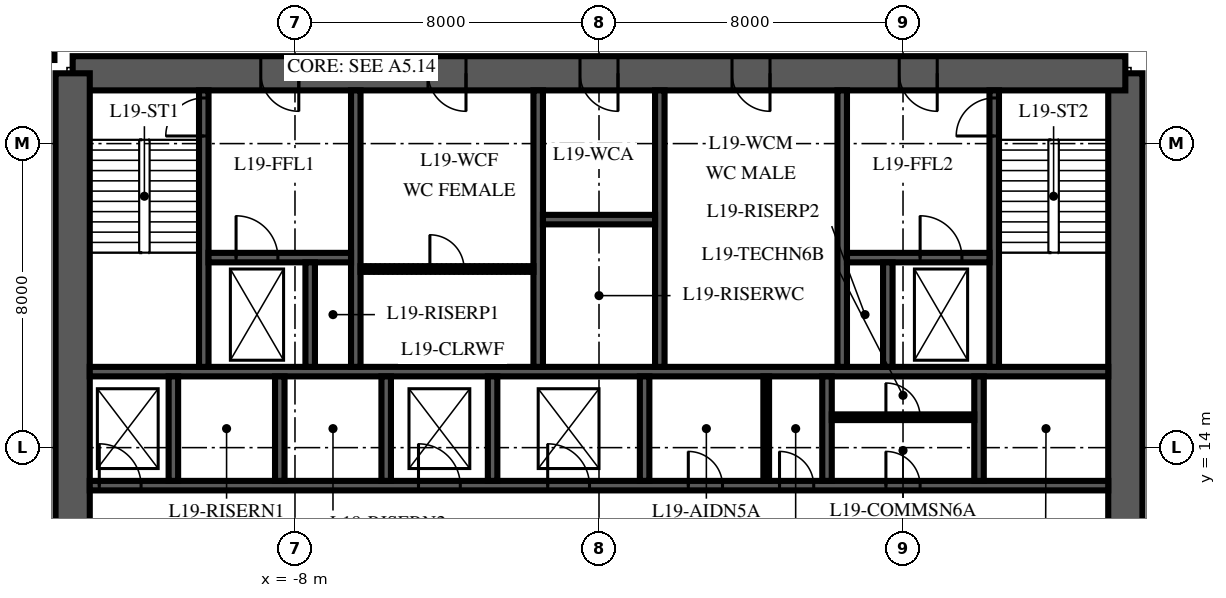
"""IFC4 building model, lengths in metres.
Left out: names, types, materials, properties, quantities, classifications, styles, units other than length and angle.
Written with IfcOpenShell. Run it as: python <this file> out.ifc"""

import sys

from ifc_helpers import new_model, si_unit, direction, frame, frame_2d, origin, place, context, subcontext, project, spatial, polyline, rectangle, outline, extrude, element, fill, save


model = new_model("IFC4")
c1 = context("Model", 3, precision=1e-05, world=origin(), true_north=direction((0.0, 1.0)))
c2 = subcontext(c1, "Body", "Model", "MODEL_VIEW")
j1 = project(units=[si_unit("LENGTHUNIT", "METRE"), si_unit("PLANEANGLEUNIT", "RADIAN")], contexts=[c1])
p1 = place(None, origin())
s1 = spatial("IfcSite", under=j1, at=p1, CompositionType="ELEMENT")
p2 = place(p1, origin())
s2 = spatial("IfcBuilding", under=s1, at=p2, CompositionType="ELEMENT")
p3 = place(p2, frame((0.0, 0.0, 88.0)))
s3 = spatial("IfcBuildingStorey", under=s2, at=p3, CompositionType="ELEMENT", Elevation=88.0)
p4 = place(p3, frame((13.85, 6.15, 0.0), z_axis=(0.0, 0.0, 1.0), x_axis=(0.0, 1.0, 0.0)))
e1 = element("IfcWall", 1, at=p4, inside=s3, PredefinedType="SHEAR", context=c2, shape_type="SweptSolid", body=[
    extrude(outline(polyline([(0.0, -0.45), (17.7, -0.45), (17.7, 0.0), (17.25, 0.0), (17.25, 0.45), (0.45, 0.45), (0.45, 0.0), (0.0, 0.0), (0.0, -0.45)])), origin(), (0.0, 0.0, 1.0), 4.0),
])
p5 = place(p4, frame((4.15, 0.0, 0.0)))
e2 = element("IfcOpeningElement", 2, at=p5, cuts=e1, PredefinedType="OPENING", context=c2, shape_type="SweptSolid", body=[
    extrude(rectangle(XDim=1.8, YDim=2.4, at=frame_2d((0.9, 1.2))), frame((0.0, 0.465, 0.0), z_axis=(0.0, -1.0, 0.0), x_axis=(1.0, 0.0, 0.0)), (0.0, 0.0, 1.0), 0.93),
])
p6 = place(p3, frame((13.85, 23.85, 0.0), z_axis=(0.0, 0.0, 1.0), x_axis=(-1.0, 0.0, 0.0)))
e3 = element("IfcWall", 3, at=p6, inside=s3, PredefinedType="SHEAR", context=c2, shape_type="SweptSolid", body=[
    extrude(rectangle(XDim=27.7, YDim=0.9, at=frame_2d((13.85, 0.0))), origin(), (0.0, 0.0, 1.0), 4.0),
])
p7 = place(p6, frame((21.75, 0.0, 0.0)))
e4 = element("IfcOpeningElement", 4, at=p7, cuts=e3, PredefinedType="OPENING", context=c2, shape_type="SweptSolid", body=[
    extrude(rectangle(XDim=1.0, YDim=2.1, at=frame_2d((0.5, 1.05))), frame((0.0, 0.465, 0.0), z_axis=(0.0, -1.0, 0.0), x_axis=(1.0, 0.0, 0.0)), (0.0, 0.0, 1.0), 0.93),
])
p8 = place(p6, frame((4.95, 0.0, 0.0)))
e5 = element("IfcOpeningElement", 5, at=p8, cuts=e3, PredefinedType="OPENING", context=c2, shape_type="SweptSolid", body=[
    extrude(rectangle(XDim=1.0, YDim=2.1, at=frame_2d((0.5, 1.05))), frame((0.0, 0.465, 0.0), z_axis=(0.0, -1.0, 0.0), x_axis=(1.0, 0.0, 0.0)), (0.0, 0.0, 1.0), 0.93),
])
p9 = place(p6, frame((17.35, 0.0, 0.0)))
e6 = element("IfcOpeningElement", 6, at=p9, cuts=e3, PredefinedType="OPENING", context=c2, shape_type="SweptSolid", body=[
    extrude(rectangle(XDim=1.0, YDim=2.1, at=frame_2d((0.5, 1.05))), frame((0.0, 0.465, 0.0), z_axis=(0.0, -1.0, 0.0), x_axis=(1.0, 0.0, 0.0)), (0.0, 0.0, 1.0), 0.93),
])
p10 = place(p6, frame((13.35, 0.0, 0.0)))
e7 = element("IfcOpeningElement", 7, at=p10, cuts=e3, PredefinedType="OPENING", context=c2, shape_type="SweptSolid", body=[
    extrude(rectangle(XDim=1.0, YDim=2.1, at=frame_2d((0.5, 1.05))), frame((0.0, 0.465, 0.0), z_axis=(0.0, -1.0, 0.0), x_axis=(1.0, 0.0, 0.0)), (0.0, 0.0, 1.0), 0.93),
])
p11 = place(p6, frame((9.35, 0.0, 0.0)))
e8 = element("IfcOpeningElement", 8, at=p11, cuts=e3, PredefinedType="OPENING", context=c2, shape_type="SweptSolid", body=[
    extrude(rectangle(XDim=1.0, YDim=2.1, at=frame_2d((0.5, 1.05))), frame((0.0, 0.465, 0.0), z_axis=(0.0, -1.0, 0.0), x_axis=(1.0, 0.0, 0.0)), (0.0, 0.0, 1.0), 0.93),
])
p12 = place(p3, frame((-13.85, 23.85, 0.0), z_axis=(0.0, 0.0, 1.0), x_axis=(0.0, -1.0, 0.0)))
e9 = element("IfcWall", 9, at=p12, inside=s3, PredefinedType="SHEAR", context=c2, shape_type="SweptSolid", body=[
    extrude(outline(polyline([(0.0, -0.45), (17.7, -0.45), (17.7, 0.0), (17.25, 0.0), (17.25, 0.45), (0.45, 0.45), (0.45, 0.0), (0.0, 0.0), (0.0, -0.45)])), origin(), (0.0, 0.0, 1.0), 4.0),
])
p13 = place(p12, frame((11.75, 0.0, 0.0)))
e10 = element("IfcOpeningElement", 10, at=p13, cuts=e9, PredefinedType="OPENING", context=c2, shape_type="SweptSolid", body=[
    extrude(rectangle(XDim=1.8, YDim=2.4, at=frame_2d((0.9, 1.2))), frame((0.0, 0.465, 0.0), z_axis=(0.0, -1.0, 0.0), x_axis=(1.0, 0.0, 0.0)), (0.0, 0.0, 1.0), 0.93),
])
p14 = place(p3, frame((-13.4, 13.0, 0.0), z_axis=(0.0, 0.0, 1.0), x_axis=(1.0, 0.0, 0.0)))
e11 = element("IfcWall", 11, at=p14, inside=s3, PredefinedType="SHEAR", context=c2, shape_type="SweptSolid", body=[
    extrude(rectangle(XDim=26.8, YDim=0.25, at=frame_2d((13.4, 0.0))), origin(), (0.0, 0.0, 1.0), 4.0),
])
p15 = place(p14, frame((0.25, 0.0, 0.0)))
e12 = element("IfcOpeningElement", 12, at=p15, cuts=e11, PredefinedType="OPENING", context=c2, shape_type="SweptSolid", body=[
    extrude(rectangle(XDim=1.1, YDim=2.1, at=frame_2d((0.55, 1.05))), frame((0.0, 0.14, 0.0), z_axis=(0.0, -1.0, 0.0), x_axis=(1.0, 0.0, 0.0)), (0.0, 0.0, 1.0), 0.28),
])
p16 = place(p14, frame((8.65, 0.0, 0.0)))
e13 = element("IfcOpeningElement", 13, at=p16, cuts=e11, PredefinedType="OPENING", context=c2, shape_type="SweptSolid", body=[
    extrude(rectangle(XDim=1.1, YDim=2.1, at=frame_2d((0.55, 1.05))), frame((0.0, 0.14, 0.0), z_axis=(0.0, -1.0, 0.0), x_axis=(1.0, 0.0, 0.0)), (0.0, 0.0, 1.0), 0.28),
])
p17 = place(p14, frame((12.05, 0.0, 0.0)))
e14 = element("IfcOpeningElement", 14, at=p17, cuts=e11, PredefinedType="OPENING", context=c2, shape_type="SweptSolid", body=[
    extrude(rectangle(XDim=1.1, YDim=2.1, at=frame_2d((0.55, 1.05))), frame((0.0, 0.14, 0.0), z_axis=(0.0, -1.0, 0.0), x_axis=(1.0, 0.0, 0.0)), (0.0, 0.0, 1.0), 0.28),
])
p18 = place(p14, frame((15.75, 0.0, 0.0)))
e15 = element("IfcOpeningElement", 15, at=p18, cuts=e11, PredefinedType="OPENING", context=c2, shape_type="SweptSolid", body=[
    extrude(rectangle(XDim=0.9, YDim=2.1, at=frame_2d((0.45, 1.05))), frame((0.0, 0.14, 0.0), z_axis=(0.0, -1.0, 0.0), x_axis=(1.0, 0.0, 0.0)), (0.0, 0.0, 1.0), 0.28),
])
p19 = place(p14, frame((18.15, 0.0, 0.0)))
e16 = element("IfcOpeningElement", 16, at=p19, cuts=e11, PredefinedType="OPENING", context=c2, shape_type="SweptSolid", body=[
    extrude(rectangle(XDim=0.9, YDim=2.1, at=frame_2d((0.45, 1.05))), frame((0.0, 0.14, 0.0), z_axis=(0.0, -1.0, 0.0), x_axis=(1.0, 0.0, 0.0)), (0.0, 0.0, 1.0), 0.28),
])
p20 = place(p14, frame((20.95, 0.0, 0.0)))
e17 = element("IfcOpeningElement", 17, at=p20, cuts=e11, PredefinedType="OPENING", context=c2, shape_type="SweptSolid", body=[
    extrude(rectangle(XDim=0.9, YDim=2.1, at=frame_2d((0.45, 1.05))), frame((0.0, 0.14, 0.0), z_axis=(0.0, -1.0, 0.0), x_axis=(1.0, 0.0, 0.0)), (0.0, 0.0, 1.0), 0.28),
])
p21 = place(p3, frame((-13.4, 16.0, 0.0), z_axis=(0.0, 0.0, 1.0), x_axis=(1.0, 0.0, 0.0)))
e18 = element("IfcWall", 18, at=p21, inside=s3, PredefinedType="SHEAR", context=c2, shape_type="SweptSolid", body=[
    extrude(rectangle(XDim=26.8, YDim=0.25, at=frame_2d((13.4, 0.0))), origin(), (0.0, 0.0, 1.0), 4.0),
])
for number, where, z_axis, x_axis in (
    (19, (-11.2, 13.125, 0.0), (0.0, 0.0, 1.0), (0.0, 1.0, 0.0)),
    (20, (-8.4, 13.125, 0.0), (0.0, 0.0, 1.0), (0.0, 1.0, 0.0)),
    (21, (-5.6, 13.125, 0.0), (0.0, 0.0, 1.0), (0.0, 1.0, 0.0)),
    (22, (-2.8, 13.125, 0.0), (0.0, 0.0, 1.0), (0.0, 1.0, 0.0)),
    (23, (1.2, 13.125, 0.0), (0.0, 0.0, 1.0), (0.0, 1.0, 0.0)),
    (24, (6.0, 13.125, 0.0), (0.0, 0.0, 1.0), (0.0, 1.0, 0.0)),
    (25, (10.0, 13.125, 0.0), (0.0, 0.0, 1.0), (0.0, 1.0, 0.0)),
):
    element("IfcWall", number, at=place(p3, frame(where, z_axis=z_axis, x_axis=x_axis)), inside=s3, PredefinedType="SHEAR", context=c2, shape_type="SweptSolid", body=[
        extrude(rectangle(XDim=2.75, YDim=0.25, at=frame_2d((1.375, 0.0))), origin(), (0.0, 0.0, 1.0), 4.0),
    ])
p22 = place(p3, frame((-10.4, 16.125, 0.0), z_axis=(0.0, 0.0, 1.0), x_axis=(0.0, 1.0, 0.0)))
e26 = element("IfcWall", 26, at=p22, inside=s3, PredefinedType="SHEAR", context=c2, shape_type="SweptSolid", body=[
    extrude(rectangle(XDim=7.275, YDim=0.25, at=frame_2d((3.637, 0.0))), origin(), (0.0, 0.0, 1.0), 4.0),
])
p23 = place(p22, frame((6.075, 0.0, 0.0)))
e27 = element("IfcOpeningElement", 27, at=p23, cuts=e26, PredefinedType="OPENING", context=c2, shape_type="SweptSolid", body=[
    extrude(rectangle(XDim=1.0, YDim=2.1, at=frame_2d((0.5, 1.05))), frame((0.0, 0.14, 0.0), z_axis=(0.0, -1.0, 0.0), x_axis=(1.0, 0.0, 0.0)), (0.0, 0.0, 1.0), 0.28),
])
for number, where, z_axis, x_axis in (
    (28, (-6.4, 16.125, 0.0), (0.0, 0.0, 1.0), (0.0, 1.0, 0.0)),
    (29, (-1.6, 16.125, 0.0), (0.0, 0.0, 1.0), (0.0, 1.0, 0.0)),
    (30, (1.6, 16.125, 0.0), (0.0, 0.0, 1.0), (0.0, 1.0, 0.0)),
    (31, (6.4, 16.125, 0.0), (0.0, 0.0, 1.0), (0.0, 1.0, 0.0)),
):
    element("IfcWall", number, at=place(p3, frame(where, z_axis=z_axis, x_axis=x_axis)), inside=s3, PredefinedType="SHEAR", context=c2, shape_type="SweptSolid", body=[
        extrude(rectangle(XDim=7.275, YDim=0.25, at=frame_2d((3.637, 0.0))), origin(), (0.0, 0.0, 1.0), 4.0),
    ])
p24 = place(p3, frame((10.4, 16.125, 0.0), z_axis=(0.0, 0.0, 1.0), x_axis=(0.0, 1.0, 0.0)))
e32 = element("IfcWall", 32, at=p24, inside=s3, PredefinedType="SHEAR", context=c2, shape_type="SweptSolid", body=[
    extrude(rectangle(XDim=7.275, YDim=0.25, at=frame_2d((3.637, 0.0))), origin(), (0.0, 0.0, 1.0), 4.0),
])
p25 = place(p24, frame((6.075, 0.0, 0.0)))
e33 = element("IfcOpeningElement", 33, at=p25, cuts=e32, PredefinedType="OPENING", context=c2, shape_type="SweptSolid", body=[
    extrude(rectangle(XDim=1.0, YDim=2.1, at=frame_2d((0.5, 1.05))), frame((0.0, 0.14, 0.0), z_axis=(0.0, -1.0, 0.0), x_axis=(1.0, 0.0, 0.0)), (0.0, 0.0, 1.0), 0.28),
])
p26 = place(p3, frame((-10.275, 19.0, 0.0), z_axis=(0.0, 0.0, 1.0), x_axis=(1.0, 0.0, 0.0)))
e34 = element("IfcWall", 34, at=p26, inside=s3, PredefinedType="SHEAR", context=c2, shape_type="SweptSolid", body=[
    extrude(rectangle(XDim=3.75, YDim=0.25, at=frame_2d((1.875, 0.0))), origin(), (0.0, 0.0, 1.0), 4.0),
])
p27 = place(p26, frame((0.725, 0.0, 0.0)))
e35 = element("IfcOpeningElement", 35, at=p27, cuts=e34, PredefinedType="OPENING", context=c2, shape_type="SweptSolid", body=[
    extrude(rectangle(XDim=1.1, YDim=2.1, at=frame_2d((0.55, 1.05))), frame((0.0, 0.14, 0.0), z_axis=(0.0, -1.0, 0.0), x_axis=(1.0, 0.0, 0.0)), (0.0, 0.0, 1.0), 0.28),
])
p28 = place(p3, frame((6.525, 19.0, 0.0), z_axis=(0.0, 0.0, 1.0), x_axis=(1.0, 0.0, 0.0)))
e36 = element("IfcWall", 36, at=p28, inside=s3, PredefinedType="SHEAR", context=c2, shape_type="SweptSolid", body=[
    extrude(rectangle(XDim=3.75, YDim=0.25, at=frame_2d((1.875, 0.0))), origin(), (0.0, 0.0, 1.0), 4.0),
])
p29 = place(p28, frame((1.925, 0.0, 0.0)))
e37 = element("IfcOpeningElement", 37, at=p29, cuts=e36, PredefinedType="OPENING", context=c2, shape_type="SweptSolid", body=[
    extrude(rectangle(XDim=1.1, YDim=2.1, at=frame_2d((0.55, 1.05))), frame((0.0, 0.14, 0.0), z_axis=(0.0, -1.0, 0.0), x_axis=(1.0, 0.0, 0.0)), (0.0, 0.0, 1.0), 0.28),
])
for number, where, z_axis, x_axis in (
    (38, (-7.6, 16.125, 0.0), (0.0, 0.0, 1.0), (0.0, 1.0, 0.0)),
    (39, (7.6, 16.125, 0.0), (0.0, 0.0, 1.0), (0.0, 1.0, 0.0)),
):
    element("IfcWall", number, at=place(p3, frame(where, z_axis=z_axis, x_axis=x_axis)), inside=s3, PredefinedType="SHEAR", context=c2, shape_type="SweptSolid", body=[
        extrude(rectangle(XDim=2.75, YDim=0.25, at=frame_2d((1.375, 0.0))), origin(), (0.0, 0.0, 1.0), 4.0),
    ])
p30 = place(p3, frame((-1.475, 20.0, 0.0), z_axis=(0.0, 0.0, 1.0), x_axis=(1.0, 0.0, 0.0)))
e40 = element("IfcWall", 40, at=p30, inside=s3, PredefinedType="SHEAR", context=c2, shape_type="SweptSolid", body=[
    extrude(rectangle(XDim=2.95, YDim=0.25, at=frame_2d((1.475, 0.0))), origin(), (0.0, 0.0, 1.0), 4.0),
])
p31 = place(p3, frame((-6.275, 18.7, 0.0), z_axis=(0.0, 0.0, 1.0), x_axis=(1.0, 0.0, 0.0)))
e41 = element("IfcWall", 41, at=p31, inside=s3, PredefinedType="PARTITIONING", context=c2, shape_type="SweptSolid", body=[
    extrude(rectangle(XDim=4.55, YDim=0.15, at=frame_2d((2.275, 0.0))), origin(), (0.0, 0.0, 1.0), 3.85),
])
p32 = place(p31, frame((1.825, 0.0, 0.0)))
e42 = element("IfcOpeningElement", 42, at=p32, cuts=e41, PredefinedType="OPENING", context=c2, shape_type="SweptSolid", body=[
    extrude(rectangle(XDim=0.9, YDim=2.1, at=frame_2d((0.45, 1.05))), frame((0.0, 0.09, 0.0), z_axis=(0.0, -1.0, 0.0), x_axis=(1.0, 0.0, 0.0)), (0.0, 0.0, 1.0), 0.18),
])
p33 = place(p3, frame((4.4, 13.125, 0.0), z_axis=(0.0, 0.0, 1.0), x_axis=(0.0, 1.0, 0.0)))
e43 = element("IfcWall", 43, at=p33, inside=s3, PredefinedType="PARTITIONING", context=c2, shape_type="SweptSolid", body=[
    extrude(rectangle(XDim=2.75, YDim=0.15, at=frame_2d((1.375, 0.0))), origin(), (0.0, 0.0, 1.0), 3.85),
])
p34 = place(p3, frame((6.125, 14.8, 0.0), z_axis=(0.0, 0.0, 1.0), x_axis=(1.0, 0.0, 0.0)))
e44 = element("IfcWall", 44, at=p34, inside=s3, PredefinedType="PARTITIONING", context=c2, shape_type="SweptSolid", body=[
    extrude(rectangle(XDim=3.75, YDim=0.15, at=frame_2d((1.875, 0.0))), origin(), (0.0, 0.0, 1.0), 3.85),
])
p35 = place(p34, frame((1.425, 0.0, 0.0)))
e45 = element("IfcOpeningElement", 45, at=p35, cuts=e44, PredefinedType="OPENING", context=c2, shape_type="SweptSolid", body=[
    extrude(rectangle(XDim=0.9, YDim=2.1, at=frame_2d((0.45, 1.05))), frame((0.0, 0.09, 0.0), z_axis=(0.0, -1.0, 0.0), x_axis=(1.0, 0.0, 0.0)), (0.0, 0.0, 1.0), 0.18),
])
p36 = place(p3, frame((-16.1, 24.3, 0.0), z_axis=(0.0, 0.0, 1.0), x_axis=(1.0, 0.0, 0.0)))
e46 = element("IfcWall", 46, at=p36, inside=s3, PredefinedType="PARTITIONING", context=c2, shape_type="SweptSolid", body=[
    extrude(rectangle(XDim=1.77, YDim=0.2, at=frame_2d((0.885, 0.0))), origin(), (0.0, 0.0, 1.0), 3.318),
])
p37 = place(p7, origin())
e47 = element("IfcDoor", 47, at=p37, inside=s3, OperationType="SINGLE_SWING_RIGHT", PredefinedType="DOOR", context=c2, shape_type="SweptSolid", body=[
    extrude(rectangle(XDim=1.0, YDim=2.1, at=frame_2d((0.5, 1.05))), frame((0.0, 0.45, 0.0), z_axis=(0.0, -1.0, 0.0), x_axis=(1.0, 0.0, 0.0)), (0.0, 0.0, 1.0), 0.899),
])
fill(e4, e47)
p38 = place(p8, origin())
e48 = element("IfcDoor", 48, at=p38, inside=s3, OperationType="SINGLE_SWING_RIGHT", PredefinedType="DOOR", context=c2, shape_type="SweptSolid", body=[
    extrude(rectangle(XDim=1.0, YDim=2.1, at=frame_2d((0.5, 1.05))), frame((0.0, 0.45, 0.0), z_axis=(0.0, -1.0, 0.0), x_axis=(1.0, 0.0, 0.0)), (0.0, 0.0, 1.0), 0.899),
])
fill(e5, e48)
p39 = place(p9, origin())
e49 = element("IfcDoor", 49, at=p39, inside=s3, OperationType="SINGLE_SWING_LEFT", PredefinedType="DOOR", context=c2, shape_type="SweptSolid", body=[
    extrude(rectangle(XDim=1.0, YDim=2.1, at=frame_2d((0.5, 1.05))), frame((0.0, 0.45, 0.0), z_axis=(0.0, -1.0, 0.0), x_axis=(1.0, 0.0, 0.0)), (0.0, 0.0, 1.0), 0.899),
])
fill(e6, e49)
p40 = place(p10, origin())
e50 = element("IfcDoor", 50, at=p40, inside=s3, OperationType="SINGLE_SWING_LEFT", PredefinedType="DOOR", context=c2, shape_type="SweptSolid", body=[
    extrude(rectangle(XDim=1.0, YDim=2.1, at=frame_2d((0.5, 1.05))), frame((0.0, 0.45, 0.0), z_axis=(0.0, -1.0, 0.0), x_axis=(1.0, 0.0, 0.0)), (0.0, 0.0, 1.0), 0.899),
])
fill(e7, e50)
p41 = place(p11, origin())
e51 = element("IfcDoor", 51, at=p41, inside=s3, OperationType="SINGLE_SWING_LEFT", PredefinedType="DOOR", context=c2, shape_type="SweptSolid", body=[
    extrude(rectangle(XDim=1.0, YDim=2.1, at=frame_2d((0.5, 1.05))), frame((0.0, 0.45, 0.0), z_axis=(0.0, -1.0, 0.0), x_axis=(1.0, 0.0, 0.0)), (0.0, 0.0, 1.0), 0.899),
])
fill(e8, e51)
p42 = place(p23, origin())
e52 = element("IfcDoor", 52, at=p42, inside=s3, OperationType="SINGLE_SWING_LEFT", PredefinedType="DOOR", context=c2, shape_type="SweptSolid", body=[
    extrude(rectangle(XDim=1.0, YDim=2.1, at=frame_2d((0.5, 1.05))), frame((0.0, 0.125, 0.0), z_axis=(0.0, -1.0, 0.0), x_axis=(1.0, 0.0, 0.0)), (0.0, 0.0, 1.0), 0.25),
])
fill(e27, e52)
p43 = place(p25, origin())
e53 = element("IfcDoor", 53, at=p43, inside=s3, OperationType="SINGLE_SWING_LEFT", PredefinedType="DOOR", context=c2, shape_type="SweptSolid", body=[
    extrude(rectangle(XDim=1.0, YDim=2.1, at=frame_2d((0.5, 1.05))), frame((0.0, 0.125, 0.0), z_axis=(0.0, -1.0, 0.0), x_axis=(1.0, 0.0, 0.0)), (0.0, 0.0, 1.0), 0.25),
])
fill(e33, e53)
p44 = place(p15, origin())
e54 = element("IfcDoor", 54, at=p44, inside=s3, OperationType="SLIDING_TO_LEFT", PredefinedType="DOOR", context=c2, shape_type="SweptSolid", body=[
    extrude(rectangle(XDim=1.1, YDim=2.1, at=frame_2d((0.55, 1.05))), frame((0.0, 0.125, 0.0), z_axis=(0.0, -1.0, 0.0), x_axis=(1.0, 0.0, 0.0)), (0.0, 0.0, 1.0), 0.25),
])
fill(e12, e54)
p45 = place(p16, origin())
e55 = element("IfcDoor", 55, at=p45, inside=s3, OperationType="SLIDING_TO_LEFT", PredefinedType="DOOR", context=c2, shape_type="SweptSolid", body=[
    extrude(rectangle(XDim=1.1, YDim=2.1, at=frame_2d((0.55, 1.05))), frame((0.0, 0.125, 0.0), z_axis=(0.0, -1.0, 0.0), x_axis=(1.0, 0.0, 0.0)), (0.0, 0.0, 1.0), 0.25),
])
fill(e13, e55)
p46 = place(p17, origin())
e56 = element("IfcDoor", 56, at=p46, inside=s3, OperationType="SLIDING_TO_LEFT", PredefinedType="DOOR", context=c2, shape_type="SweptSolid", body=[
    extrude(rectangle(XDim=1.1, YDim=2.1, at=frame_2d((0.55, 1.05))), frame((0.0, 0.125, 0.0), z_axis=(0.0, -1.0, 0.0), x_axis=(1.0, 0.0, 0.0)), (0.0, 0.0, 1.0), 0.25),
])
fill(e14, e56)
p47 = place(p29, origin())
e57 = element("IfcDoor", 57, at=p47, inside=s3, OperationType="SLIDING_TO_RIGHT", PredefinedType="DOOR", context=c2, shape_type="SweptSolid", body=[
    extrude(rectangle(XDim=1.1, YDim=2.1, at=frame_2d((0.55, 1.05))), frame((0.0, 0.125, 0.0), z_axis=(0.0, -1.0, 0.0), x_axis=(1.0, 0.0, 0.0)), (0.0, 0.0, 1.0), 0.25),
])
fill(e37, e57)
p48 = place(p27, origin())
e58 = element("IfcDoor", 58, at=p48, inside=s3, OperationType="SLIDING_TO_RIGHT", PredefinedType="DOOR", context=c2, shape_type="SweptSolid", body=[
    extrude(rectangle(XDim=1.1, YDim=2.1, at=frame_2d((0.55, 1.05))), frame((0.0, 0.125, 0.0), z_axis=(0.0, -1.0, 0.0), x_axis=(1.0, 0.0, 0.0)), (0.0, 0.0, 1.0), 0.25),
])
fill(e35, e58)
p49 = place(p18, origin())
e59 = element("IfcDoor", 59, at=p49, inside=s3, OperationType="SINGLE_SWING_LEFT", PredefinedType="DOOR", context=c2, shape_type="SweptSolid", body=[
    extrude(rectangle(XDim=0.9, YDim=2.1, at=frame_2d((0.45, 1.05))), frame((0.0, 0.125, 0.0), z_axis=(0.0, -1.0, 0.0), x_axis=(1.0, 0.0, 0.0)), (0.0, 0.0, 1.0), 0.25),
])
fill(e15, e59)
p50 = place(p19, origin())
e60 = element("IfcDoor", 60, at=p50, inside=s3, OperationType="SINGLE_SWING_LEFT", PredefinedType="DOOR", context=c2, shape_type="SweptSolid", body=[
    extrude(rectangle(XDim=0.9, YDim=2.1, at=frame_2d((0.45, 1.05))), frame((0.0, 0.125, 0.0), z_axis=(0.0, -1.0, 0.0), x_axis=(1.0, 0.0, 0.0)), (0.0, 0.0, 1.0), 0.25),
])
fill(e16, e60)
p51 = place(p20, origin())
e61 = element("IfcDoor", 61, at=p51, inside=s3, OperationType="SINGLE_SWING_LEFT", PredefinedType="DOOR", context=c2, shape_type="SweptSolid", body=[
    extrude(rectangle(XDim=0.9, YDim=2.1, at=frame_2d((0.45, 1.05))), frame((0.0, 0.125, 0.0), z_axis=(0.0, -1.0, 0.0), x_axis=(1.0, 0.0, 0.0)), (0.0, 0.0, 1.0), 0.25),
])
fill(e17, e61)
p52 = place(p35, origin())
e62 = element("IfcDoor", 62, at=p52, inside=s3, OperationType="SINGLE_SWING_LEFT", PredefinedType="DOOR", context=c2, shape_type="SweptSolid", body=[
    extrude(rectangle(XDim=0.9, YDim=2.1, at=frame_2d((0.45, 1.05))), frame((0.0, 0.075, 0.0), z_axis=(0.0, -1.0, 0.0), x_axis=(1.0, 0.0, 0.0)), (0.0, 0.0, 1.0), 0.149),
])
fill(e45, e62)
p53 = place(p32, origin())
e63 = element("IfcDoor", 63, at=p53, inside=s3, OperationType="SINGLE_SWING_LEFT", PredefinedType="DOOR", context=c2, shape_type="SweptSolid", body=[
    extrude(rectangle(XDim=0.9, YDim=2.1, at=frame_2d((0.45, 1.05))), frame((0.0, 0.075, 0.0), z_axis=(0.0, -1.0, 0.0), x_axis=(1.0, 0.0, 0.0)), (0.0, 0.0, 1.0), 0.149),
])
fill(e42, e63)
save(model, sys.argv[1])
